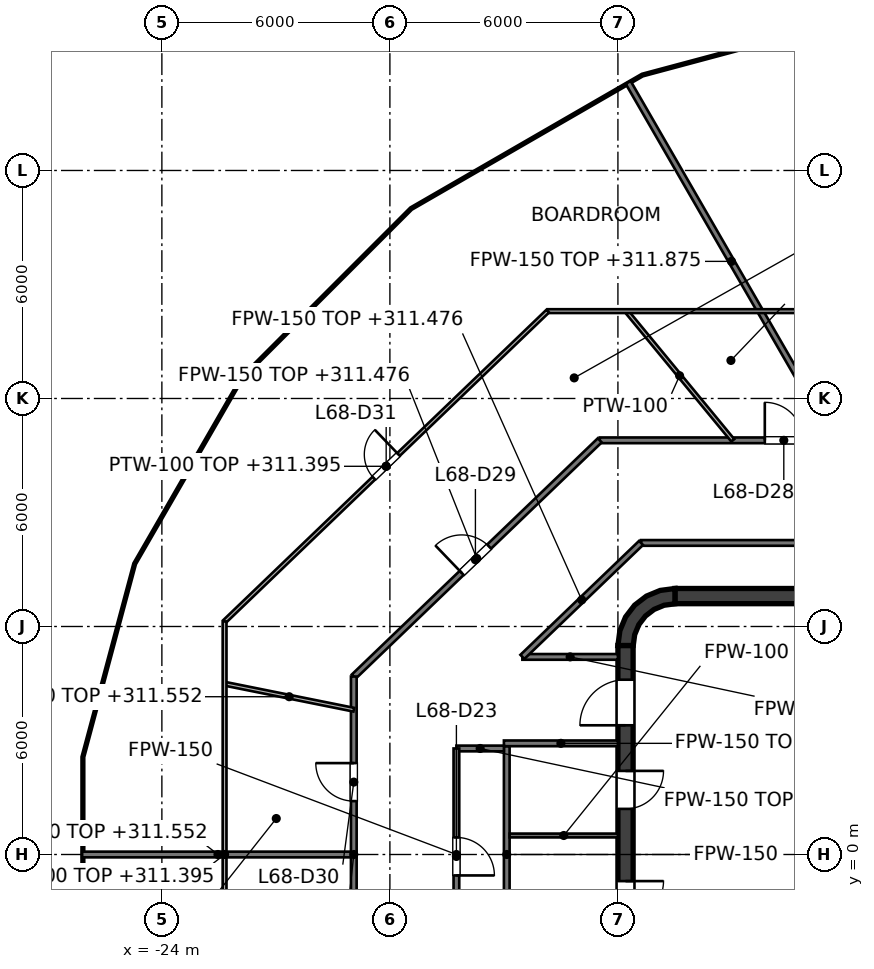
"""IFC4 building model, lengths in metres.
Left out: names, types, materials, properties, quantities, classifications, styles, units other than length and angle.
Written with IfcOpenShell. Run it as: python <this file> out.ifc"""

import sys

from ifc_helpers import new_model, si_unit, direction, frame, frame_2d, origin, place, context, subcontext, project, spatial, polyline, rectangle, outline, extrude, element, fill, save


model = new_model("IFC4")
c1 = context("Model", 3, precision=1e-05, world=origin(), true_north=direction((0.0, 1.0)))
c2 = subcontext(c1, "Body", "Model", "MODEL_VIEW")
j1 = project(units=[si_unit("LENGTHUNIT", "METRE"), si_unit("PLANEANGLEUNIT", "RADIAN")], contexts=[c1])
p1 = place(None, origin())
s1 = spatial("IfcSite", under=j1, at=p1, CompositionType="ELEMENT")
p2 = place(p1, origin())
s2 = spatial("IfcBuilding", under=s1, at=p2, CompositionType="ELEMENT")
p3 = place(p2, frame((0.0, 0.0, 308.4)))
s3 = spatial("IfcBuildingStorey", under=s2, at=p3, CompositionType="ELEMENT", Elevation=308.4)
p4 = place(p3, frame((-10.5, 6.8, 0.0), z_axis=(0.0, 0.0, 1.0), x_axis=(1.0, 0.0, 0.0)))
e1 = element("IfcWall", 1, at=p4, inside=s3, PredefinedType="SHEAR", context=c2, shape_type="SweptSolid", body=[
    extrude(rectangle(XDim=21.0, YDim=0.4, at=frame_2d((10.5, 0.0))), origin(), (0.0, 0.0, 1.0), 4.0),
])
p5 = place(p3, frame((-11.8, -5.5, 0.0), z_axis=(0.0, 0.0, 1.0), x_axis=(0.0, 1.0, 0.0)))
e2 = element("IfcWall", 2, at=p5, inside=s3, PredefinedType="SHEAR", context=c2, shape_type="SweptSolid", body=[
    extrude(rectangle(XDim=11.0, YDim=0.4, at=frame_2d((5.5, 0.0))), origin(), (0.0, 0.0, 1.0), 4.0),
])
p6 = place(p5, frame((3.8, 0.0, 0.0)))
e3 = element("IfcOpeningElement", 3, at=p6, cuts=e2, PredefinedType="OPENING", context=c2, shape_type="SweptSolid", body=[
    extrude(rectangle(XDim=1.0, YDim=2.1, at=frame_2d((0.5, 1.05))), frame((0.0, 0.2, 0.0), z_axis=(0.0, -1.0, 0.0), x_axis=(1.0, 0.0, 0.0)), (0.0, 0.0, 1.0), 0.4),
])
p7 = place(p5, frame((6.7, 0.0, 0.0)))
e4 = element("IfcOpeningElement", 4, at=p7, cuts=e2, PredefinedType="OPENING", context=c2, shape_type="SweptSolid", body=[
    extrude(rectangle(XDim=1.0, YDim=2.1, at=frame_2d((0.5, 1.05))), frame((0.0, 0.2, 0.0), z_axis=(0.0, -1.0, 0.0), x_axis=(1.0, 0.0, 0.0)), (0.0, 0.0, 1.0), 0.4),
])
p8 = place(p5, frame((0.9, 0.0, 0.0)))
e5 = element("IfcOpeningElement", 5, at=p8, cuts=e2, PredefinedType="OPENING", context=c2, shape_type="SweptSolid", body=[
    extrude(rectangle(XDim=1.2, YDim=2.1, at=frame_2d((0.6, 1.05))), frame((0.0, 0.2, 0.0), z_axis=(0.0, -1.0, 0.0), x_axis=(1.0, 0.0, 0.0)), (0.0, 0.0, 1.0), 0.4),
])
p9 = place(p5, frame((8.9, 0.0, 0.0)))
e6 = element("IfcOpeningElement", 6, at=p9, cuts=e2, PredefinedType="OPENING", context=c2, shape_type="SweptSolid", body=[
    extrude(rectangle(XDim=1.2, YDim=2.1, at=frame_2d((0.6, 1.05))), frame((0.0, 0.2, 0.0), z_axis=(0.0, -1.0, 0.0), x_axis=(1.0, 0.0, 0.0)), (0.0, 0.0, 1.0), 0.4),
])
p10 = place(p3, origin())
e7 = element("IfcWall", 7, at=p10, inside=s3, PredefinedType="SHEAR", context=c2, shape_type="SweptSolid", body=[
    extrude(outline(polyline([(-12.0, 5.5), (-11.596, 5.5), (-11.559, 5.784), (-11.45, 6.048), (-11.275, 6.275), (-11.048, 6.45), (-10.784, 6.559), (-10.5, 6.596), (-10.5, 7.0), (-10.888, 6.949), (-11.25, 6.799), (-11.561, 6.561), (-11.799, 6.25), (-11.949, 5.888), (-12.0, 5.5)])), origin(), (0.0, 0.0, 1.0), 4.0),
])
p11 = place(p3, frame((-9.0, 4.1, 0.0), z_axis=(0.0, 0.0, 1.0), x_axis=(0.0, 1.0, 0.0)))
e8 = element("IfcWall", 8, at=p11, inside=s3, PredefinedType="SOLIDWALL", context=c2, shape_type="SweptSolid", body=[
    extrude(rectangle(XDim=2.5, YDim=0.25, at=frame_2d((1.25, 0.0))), origin(), (0.0, 0.0, 1.0), 3.85),
])
p12 = place(p11, frame((0.65, 0.0, 0.0)))
e9 = element("IfcOpeningElement", 9, at=p12, cuts=e8, PredefinedType="OPENING", context=c2, shape_type="SweptSolid", body=[
    extrude(rectangle(XDim=1.2, YDim=2.1, at=frame_2d((0.6, 1.05))), frame((0.0, 0.125, 0.0), z_axis=(0.0, -1.0, 0.0), x_axis=(1.0, 0.0, 0.0)), (0.0, 0.0, 1.0), 0.25),
])
p13 = place(p3, frame((-9.125, 1.525, 0.0), z_axis=(0.0, 0.0, 1.0), x_axis=(1.0, 0.0, 0.0)))
e10 = element("IfcWall", 10, at=p13, inside=s3, PredefinedType="SOLIDWALL", context=c2, shape_type="SweptSolid", body=[
    extrude(rectangle(XDim=8.35, YDim=0.25, at=frame_2d((4.175, 0.0))), origin(), (0.0, 0.0, 1.0), 3.85),
])
p14 = place(p13, frame((0.925, 0.0, 0.0)))
e11 = element("IfcOpeningElement", 11, at=p14, cuts=e10, PredefinedType="OPENING", context=c2, shape_type="SweptSolid", body=[
    extrude(rectangle(XDim=1.1, YDim=2.1, at=frame_2d((0.55, 1.05))), frame((0.0, 0.125, 0.0), z_axis=(0.0, -1.0, 0.0), x_axis=(1.0, 0.0, 0.0)), (0.0, 0.0, 1.0), 0.25),
])
p15 = place(p13, frame((3.625, 0.0, 0.0)))
e12 = element("IfcOpeningElement", 12, at=p15, cuts=e10, PredefinedType="OPENING", context=c2, shape_type="SweptSolid", body=[
    extrude(rectangle(XDim=1.1, YDim=2.1, at=frame_2d((0.55, 1.05))), frame((0.0, 0.125, 0.0), z_axis=(0.0, -1.0, 0.0), x_axis=(1.0, 0.0, 0.0)), (0.0, 0.0, 1.0), 0.25),
])
p16 = place(p13, frame((6.325, 0.0, 0.0)))
e13 = element("IfcOpeningElement", 13, at=p16, cuts=e10, PredefinedType="OPENING", context=c2, shape_type="SweptSolid", body=[
    extrude(rectangle(XDim=1.1, YDim=2.1, at=frame_2d((0.55, 1.05))), frame((0.0, 0.125, 0.0), z_axis=(0.0, -1.0, 0.0), x_axis=(1.0, 0.0, 0.0)), (0.0, 0.0, 1.0), 0.25),
])
p17 = place(p3, frame((-9.125, 3.975, 0.0), z_axis=(0.0, 0.0, 1.0), x_axis=(1.0, 0.0, 0.0)))
e14 = element("IfcWall", 14, at=p17, inside=s3, PredefinedType="SOLIDWALL", context=c2, shape_type="SweptSolid", body=[
    extrude(rectangle(XDim=8.35, YDim=0.25, at=frame_2d((4.175, 0.0))), origin(), (0.0, 0.0, 1.0), 3.85),
])
p18 = place(p3, frame((-9.0, 1.65, 0.0), z_axis=(0.0, 0.0, 1.0), x_axis=(0.0, 1.0, 0.0)))
e15 = element("IfcWall", 15, at=p18, inside=s3, PredefinedType="SOLIDWALL", context=c2, shape_type="SweptSolid", body=[
    extrude(rectangle(XDim=2.2, YDim=0.25, at=frame_2d((1.1, 0.0))), origin(), (0.0, 0.0, 1.0), 3.85),
])
p19 = place(p3, frame((-14.925, -2.85, 0.0), z_axis=(0.0, 0.0, 1.0), x_axis=(0.0, 1.0, 0.0)))
e16 = element("IfcWall", 16, at=p19, inside=s3, PredefinedType="PARTITIONING", context=c2, shape_type="SweptSolid", body=[
    extrude(rectangle(XDim=5.7, YDim=0.15, at=frame_2d((2.85, 0.0))), origin(), (0.0, 0.0, 1.0), 2.995),
])
p20 = place(p3, frame((-15.0, 2.925, 0.0), z_axis=(0.0, 0.0, 1.0), x_axis=(1.0, 0.0, 0.0)))
e17 = element("IfcWall", 17, at=p20, inside=s3, PredefinedType="PARTITIONING", context=c2, shape_type="SweptSolid", body=[
    extrude(rectangle(XDim=3.0, YDim=0.15, at=frame_2d((1.5, 0.0))), origin(), (0.0, 0.0, 1.0), 3.152),
])
p21 = place(p3, frame((-14.85, 0.5, 0.0), z_axis=(0.0, 0.0, 1.0), x_axis=(1.0, 0.0, 0.0)))
e18 = element("IfcWall", 18, at=p21, inside=s3, PredefinedType="PARTITIONING", context=c2, shape_type="SweptSolid", body=[
    extrude(rectangle(XDim=2.85, YDim=0.1, at=frame_2d((1.425, 0.0))), origin(), (0.0, 0.0, 1.0), 3.85),
])
p22 = place(p3, frame((-11.73, 20.317, 0.0), z_axis=(0.0, 0.0, 1.0), x_axis=(0.49996861439, -0.866043523516, 0.0)))
e19 = element("IfcWall", 19, at=p22, inside=s3, PredefinedType="PARTITIONING", context=c2, shape_type="SweptSolid", body=[
    extrude(rectangle(XDim=10.875, YDim=0.15, at=frame_2d((5.438, 0.0))), origin(), (0.0, 0.0, 1.0), 3.475),
])
p23 = place(p3, frame((-26.098, 0.0, 0.0), z_axis=(0.0, 0.0, 1.0), x_axis=(1.0, 0.0, 0.0)))
e20 = element("IfcWall", 20, at=p23, inside=s3, PredefinedType="PARTITIONING", context=c2, shape_type="SweptSolid", body=[
    extrude(rectangle(XDim=7.148, YDim=0.15, at=frame_2d((3.574, 0.0))), origin(), (0.0, 0.0, 1.0), 3.152),
])
p24 = place(p3, frame((-16.25, 2.79, 0.0), z_axis=(0.0, 0.0, 1.0), x_axis=(1.0, 0.0, 0.0)))
e21 = element("IfcWall", 21, at=p24, inside=s3, PredefinedType="PARTITIONING", context=c2, shape_type="SweptSolid", body=[
    extrude(rectangle(XDim=1.25, YDim=0.15, at=frame_2d((0.625, 0.0))), origin(), (0.0, 0.0, 1.0), 3.85),
])
p25 = place(p3, frame((-14.514, 5.2, 0.0), z_axis=(0.0, 0.0, 1.0), x_axis=(1.0, 0.0, 0.0)))
e22 = element("IfcWall", 22, at=p25, inside=s3, PredefinedType="PARTITIONING", context=c2, shape_type="SweptSolid", body=[
    extrude(rectangle(XDim=2.514, YDim=0.15, at=frame_2d((1.257, 0.0))), origin(), (0.0, 0.0, 1.0), 3.85),
])
p26 = place(p3, frame((-11.391, 8.199, 0.0), z_axis=(0.0, 0.0, 1.0), x_axis=(1.0, 0.0, 0.0)))
e23 = element("IfcWall", 23, at=p26, inside=s3, PredefinedType="PARTITIONING", context=c2, shape_type="SweptSolid", body=[
    extrude(rectangle(XDim=22.782, YDim=0.15, at=frame_2d((11.391, 0.0))), origin(), (0.0, 0.0, 1.0), 2.927),
])
p27 = place(p26, frame((16.536, 0.0, 0.0)))
e24 = element("IfcOpeningElement", 24, at=p27, cuts=e23, PredefinedType="OPENING", context=c2, shape_type="SweptSolid", body=[
    extrude(rectangle(XDim=1.0, YDim=2.1, at=frame_2d((0.5, 1.05))), frame((0.0, 0.075, 0.0), z_axis=(0.0, -1.0, 0.0), x_axis=(1.0, 0.0, 0.0)), (0.0, 0.0, 1.0), 0.15),
])
p28 = place(p26, frame((5.145, 0.0, 0.0)))
e25 = element("IfcOpeningElement", 25, at=p28, cuts=e23, PredefinedType="OPENING", context=c2, shape_type="SweptSolid", body=[
    extrude(rectangle(XDim=1.0, YDim=2.1, at=frame_2d((0.5, 1.05))), frame((0.0, 0.075, 0.0), z_axis=(0.0, -1.0, 0.0), x_axis=(1.0, 0.0, 0.0)), (0.0, 0.0, 1.0), 0.15),
])
p29 = place(p3, frame((-12.478, 10.899, 0.0), z_axis=(0.0, 0.0, 1.0), x_axis=(1.0, 0.0, 0.0)))
e26 = element("IfcWall", 26, at=p29, inside=s3, PredefinedType="PARTITIONING", context=c2, shape_type="SweptSolid", body=[
    extrude(rectangle(XDim=24.956, YDim=0.15, at=frame_2d((12.478, 0.0))), origin(), (0.0, 0.0, 1.0), 2.927),
])
p30 = place(p29, frame((19.856, 0.0, 0.0)))
e27 = element("IfcOpeningElement", 27, at=p30, cuts=e26, PredefinedType="OPENING", context=c2, shape_type="SweptSolid", body=[
    extrude(rectangle(XDim=1.0, YDim=2.1, at=frame_2d((0.5, 1.05))), frame((0.0, 0.075, 0.0), z_axis=(0.0, -1.0, 0.0), x_axis=(1.0, 0.0, 0.0)), (0.0, 0.0, 1.0), 0.15),
])
p31 = place(p29, frame((14.508, 0.0, 0.0)))
e28 = element("IfcOpeningElement", 28, at=p31, cuts=e26, PredefinedType="OPENING", context=c2, shape_type="SweptSolid", body=[
    extrude(rectangle(XDim=1.0, YDim=2.1, at=frame_2d((0.5, 1.05))), frame((0.0, 0.075, 0.0), z_axis=(0.0, -1.0, 0.0), x_axis=(1.0, 0.0, 0.0)), (0.0, 0.0, 1.0), 0.15),
])
p32 = place(p29, frame((9.085, 0.0, 0.0)))
e29 = element("IfcOpeningElement", 29, at=p32, cuts=e26, PredefinedType="OPENING", context=c2, shape_type="SweptSolid", body=[
    extrude(rectangle(XDim=1.0, YDim=2.1, at=frame_2d((0.5, 1.05))), frame((0.0, 0.075, 0.0), z_axis=(0.0, -1.0, 0.0), x_axis=(1.0, 0.0, 0.0)), (0.0, 0.0, 1.0), 0.15),
])
p33 = place(p29, frame((4.343, 0.0, 0.0)))
e30 = element("IfcOpeningElement", 30, at=p33, cuts=e26, PredefinedType="OPENING", context=c2, shape_type="SweptSolid", body=[
    extrude(rectangle(XDim=1.0, YDim=2.1, at=frame_2d((0.5, 1.05))), frame((0.0, 0.075, 0.0), z_axis=(0.0, -1.0, 0.0), x_axis=(1.0, 0.0, 0.0)), (0.0, 0.0, 1.0), 0.15),
])
p34 = place(p3, frame((-14.514, 5.2, 0.0), z_axis=(0.0, 0.0, 1.0), x_axis=(0.721228427004, 0.692697304803, 0.0)))
e31 = element("IfcWall", 31, at=p34, inside=s3, PredefinedType="PARTITIONING", context=c2, shape_type="SweptSolid", body=[
    extrude(rectangle(XDim=4.33, YDim=0.15, at=frame_2d((2.165, 0.0))), origin(), (0.0, 0.0, 1.0), 3.076),
])
p35 = place(p3, frame((-18.95, 4.683, 0.0), z_axis=(0.0, 0.0, 1.0), x_axis=(0.721259541977, 0.692664906797, 0.0)))
e32 = element("IfcWall", 32, at=p35, inside=s3, PredefinedType="PARTITIONING", context=c2, shape_type="SweptSolid", body=[
    extrude(rectangle(XDim=8.973, YDim=0.15, at=frame_2d((4.487, 0.0))), origin(), (0.0, 0.0, 1.0), 3.076),
])
p36 = place(p35, frame((3.937, 0.0, 0.0)))
e33 = element("IfcOpeningElement", 33, at=p36, cuts=e32, PredefinedType="OPENING", context=c2, shape_type="SweptSolid", body=[
    extrude(rectangle(XDim=1.0, YDim=2.1, at=frame_2d((0.5, 1.05))), frame((0.0, 0.075, 0.0), z_axis=(0.0, -1.0, 0.0), x_axis=(1.0, 0.0, 0.0)), (0.0, 0.0, 1.0), 0.15),
])
p37 = place(p3, frame((-16.25, -2.79, 0.0), z_axis=(0.0, 0.0, 1.0), x_axis=(0.0, 1.0, 0.0)))
e34 = element("IfcWall", 34, at=p37, inside=s3, PredefinedType="PARTITIONING", context=c2, shape_type="SweptSolid", body=[
    extrude(rectangle(XDim=5.58, YDim=0.15, at=frame_2d((2.79, 0.0))), origin(), (0.0, 0.0, 1.0), 2.995),
])
p38 = place(p37, frame((2.239, 0.0, 0.0)))
e35 = element("IfcOpeningElement", 35, at=p38, cuts=e34, PredefinedType="OPENING", context=c2, shape_type="SweptSolid", body=[
    extrude(rectangle(XDim=1.0, YDim=2.1, at=frame_2d((0.5, 1.05))), frame((0.0, 0.075, 0.0), z_axis=(0.0, -1.0, 0.0), x_axis=(1.0, 0.0, 0.0)), (0.0, 0.0, 1.0), 0.15),
])
p39 = place(p3, frame((-18.95, -4.683, 0.0), z_axis=(0.0, 0.0, 1.0), x_axis=(0.0, 1.0, 0.0)))
e36 = element("IfcWall", 36, at=p39, inside=s3, PredefinedType="PARTITIONING", context=c2, shape_type="SweptSolid", body=[
    extrude(rectangle(XDim=9.366, YDim=0.15, at=frame_2d((4.683, 0.0))), origin(), (0.0, 0.0, 1.0), 2.995),
])
p40 = place(p39, frame((6.088, 0.0, 0.0)))
e37 = element("IfcOpeningElement", 37, at=p40, cuts=e36, PredefinedType="OPENING", context=c2, shape_type="SweptSolid", body=[
    extrude(rectangle(XDim=1.0, YDim=2.1, at=frame_2d((0.5, 1.05))), frame((0.0, 0.075, 0.0), z_axis=(0.0, -1.0, 0.0), x_axis=(1.0, 0.0, 0.0)), (0.0, 0.0, 1.0), 0.15),
])
p41 = place(p3, frame((-11.777, 14.299, 0.0), z_axis=(0.0, 0.0, 1.0), x_axis=(0.63569753872, -0.771938235396, 0.0)))
e38 = element("IfcWall", 38, at=p41, inside=s3, PredefinedType="PARTITIONING", context=c2, shape_type="SweptSolid", body=[
    extrude(rectangle(XDim=4.405, YDim=0.1, at=frame_2d((2.202, 0.0))), origin(), (0.0, 0.0, 1.0), 3.85),
])
p42 = place(p3, frame((-22.35, 4.494, 0.0), z_axis=(0.0, 0.0, 1.0), x_axis=(0.980368926978, -0.197171922486, 0.0)))
e39 = element("IfcWall", 39, at=p42, inside=s3, PredefinedType="PARTITIONING", context=c2, shape_type="SweptSolid", body=[
    extrude(rectangle(XDim=3.468, YDim=0.1, at=frame_2d((1.734, 0.0))), origin(), (0.0, 0.0, 1.0), 3.152),
])
p43 = place(p3, frame((-13.846, 14.299, 0.0), z_axis=(0.0, 0.0, 1.0), x_axis=(1.0, 0.0, 0.0)))
e40 = element("IfcWall", 40, at=p43, inside=s3, PredefinedType="PARTITIONING", context=c2, shape_type="SweptSolid", body=[
    extrude(rectangle(XDim=27.692, YDim=0.1, at=frame_2d((13.846, 0.0))), origin(), (0.0, 0.0, 1.0), 2.927),
])
p44 = place(p43, frame((9.035, 0.0, 0.0)))
e41 = element("IfcOpeningElement", 41, at=p44, cuts=e40, PredefinedType="OPENING", context=c2, shape_type="SweptSolid", body=[
    extrude(rectangle(XDim=1.8, YDim=2.1, at=frame_2d((0.9, 1.05))), frame((0.0, 0.05, 0.0), z_axis=(0.0, -1.0, 0.0), x_axis=(1.0, 0.0, 0.0)), (0.0, 0.0, 1.0), 0.1),
])
p45 = place(p3, frame((-22.35, 6.132, 0.0), z_axis=(0.0, 0.0, 1.0), x_axis=(0.721259864686, 0.692664570765, 0.0)))
e42 = element("IfcWall", 42, at=p45, inside=s3, PredefinedType="PARTITIONING", context=c2, shape_type="SweptSolid", body=[
    extrude(rectangle(XDim=11.791, YDim=0.1, at=frame_2d((5.896, 0.0))), origin(), (0.0, 0.0, 1.0), 2.995),
])
p46 = place(p45, frame((5.445, 0.0, 0.0)))
e43 = element("IfcOpeningElement", 43, at=p46, cuts=e42, PredefinedType="OPENING", context=c2, shape_type="SweptSolid", body=[
    extrude(rectangle(XDim=0.9, YDim=2.1, at=frame_2d((0.45, 1.05))), frame((0.0, 0.05, 0.0), z_axis=(0.0, -1.0, 0.0), x_axis=(1.0, 0.0, 0.0)), (0.0, 0.0, 1.0), 0.1),
])
p47 = place(p3, frame((-22.35, -6.132, 0.0), z_axis=(0.0, 0.0, 1.0), x_axis=(0.0, 1.0, 0.0)))
e44 = element("IfcWall", 44, at=p47, inside=s3, PredefinedType="PARTITIONING", context=c2, shape_type="SweptSolid", body=[
    extrude(rectangle(XDim=12.264, YDim=0.1, at=frame_2d((6.132, 0.0))), origin(), (0.0, 0.0, 1.0), 2.995),
])
p48 = place(p14, origin())
e45 = element("IfcDoor", 45, at=p48, inside=s3, OperationType="DOUBLE_DOOR_SLIDING", PredefinedType="DOOR", context=c2, shape_type="SweptSolid", body=[
    extrude(rectangle(XDim=1.1, YDim=2.1, at=frame_2d((0.55, 1.05))), frame((0.0, 0.025, 0.0), z_axis=(0.0, -1.0, 0.0), x_axis=(1.0, 0.0, 0.0)), (0.0, 0.0, 1.0), 0.05),
])
fill(e11, e45)
p49 = place(p12, origin())
e46 = element("IfcDoor", 46, at=p49, inside=s3, OperationType="SINGLE_SWING_RIGHT", PredefinedType="DOOR", context=c2, shape_type="SweptSolid", body=[
    extrude(rectangle(XDim=1.2, YDim=2.1, at=frame_2d((0.6, 1.05))), frame((0.0, 0.025, 0.0), z_axis=(0.0, -1.0, 0.0), x_axis=(1.0, 0.0, 0.0)), (0.0, 0.0, 1.0), 0.05),
])
fill(e9, e46)
p50 = place(p6, origin())
e47 = element("IfcDoor", 47, at=p50, inside=s3, OperationType="SINGLE_SWING_RIGHT", PredefinedType="DOOR", context=c2, shape_type="SweptSolid", body=[
    extrude(rectangle(XDim=1.0, YDim=2.1, at=frame_2d((0.5, 1.05))), frame((0.0, 0.025, 0.0), z_axis=(0.0, -1.0, 0.0), x_axis=(1.0, 0.0, 0.0)), (0.0, 0.0, 1.0), 0.05),
])
fill(e3, e47)
p51 = place(p7, origin())
e48 = element("IfcDoor", 48, at=p51, inside=s3, OperationType="SINGLE_SWING_RIGHT", PredefinedType="DOOR", context=c2, shape_type="SweptSolid", body=[
    extrude(rectangle(XDim=1.0, YDim=2.1, at=frame_2d((0.5, 1.05))), frame((0.0, 0.025, 0.0), z_axis=(0.0, -1.0, 0.0), x_axis=(1.0, 0.0, 0.0)), (0.0, 0.0, 1.0), 0.05),
])
fill(e4, e48)
p52 = place(p9, origin())
e49 = element("IfcDoor", 49, at=p52, inside=s3, OperationType="SINGLE_SWING_LEFT", PredefinedType="DOOR", context=c2, shape_type="SweptSolid", body=[
    extrude(rectangle(XDim=1.2, YDim=2.1, at=frame_2d((0.6, 1.05))), frame((0.0, 0.025, 0.0), z_axis=(0.0, -1.0, 0.0), x_axis=(1.0, 0.0, 0.0)), (0.0, 0.0, 1.0), 0.05),
])
fill(e6, e49)
p53 = place(p38, origin())
e50 = element("IfcDoor", 50, at=p53, inside=s3, OperationType="SINGLE_SWING_LEFT", PredefinedType="DOOR", context=c2, shape_type="SweptSolid", body=[
    extrude(rectangle(XDim=1.0, YDim=2.1, at=frame_2d((0.5, 1.05))), frame((0.0, 0.025, 0.0), z_axis=(0.0, -1.0, 0.0), x_axis=(1.0, 0.0, 0.0)), (0.0, 0.0, 1.0), 0.05),
])
fill(e35, e50)
p54 = place(p33, origin())
e51 = element("IfcDoor", 51, at=p54, inside=s3, OperationType="SINGLE_SWING_LEFT", PredefinedType="DOOR", context=c2, shape_type="SweptSolid", body=[
    extrude(rectangle(XDim=1.0, YDim=2.1, at=frame_2d((0.5, 1.05))), frame((0.0, 0.025, 0.0), z_axis=(0.0, -1.0, 0.0), x_axis=(1.0, 0.0, 0.0)), (0.0, 0.0, 1.0), 0.05),
])
fill(e30, e51)
p55 = place(p36, origin())
e52 = element("IfcDoor", 52, at=p55, inside=s3, OperationType="SINGLE_SWING_LEFT", PredefinedType="DOOR", context=c2, shape_type="SweptSolid", body=[
    extrude(rectangle(XDim=1.0, YDim=2.1, at=frame_2d((0.5, 1.05))), frame((0.0, 0.025, 0.0), z_axis=(0.0, -1.0, 0.0), x_axis=(1.0, 0.0, 0.0)), (0.0, 0.0, 1.0), 0.05),
])
fill(e33, e52)
p56 = place(p40, origin())
e53 = element("IfcDoor", 53, at=p56, inside=s3, OperationType="SINGLE_SWING_RIGHT", PredefinedType="DOOR", context=c2, shape_type="SweptSolid", body=[
    extrude(rectangle(XDim=1.0, YDim=2.1, at=frame_2d((0.5, 1.05))), frame((0.0, 0.025, 0.0), z_axis=(0.0, -1.0, 0.0), x_axis=(1.0, 0.0, 0.0)), (0.0, 0.0, 1.0), 0.05),
])
fill(e37, e53)
p57 = place(p46, origin())
e54 = element("IfcDoor", 54, at=p57, inside=s3, OperationType="SINGLE_SWING_RIGHT", PredefinedType="DOOR", context=c2, shape_type="SweptSolid", body=[
    extrude(rectangle(XDim=0.9, YDim=2.1, at=frame_2d((0.45, 1.05))), frame((0.0, 0.025, 0.0), z_axis=(0.0, -1.0, 0.0), x_axis=(1.0, 0.0, 0.0)), (0.0, 0.0, 1.0), 0.05),
])
fill(e43, e54)
save(model, sys.argv[1])
